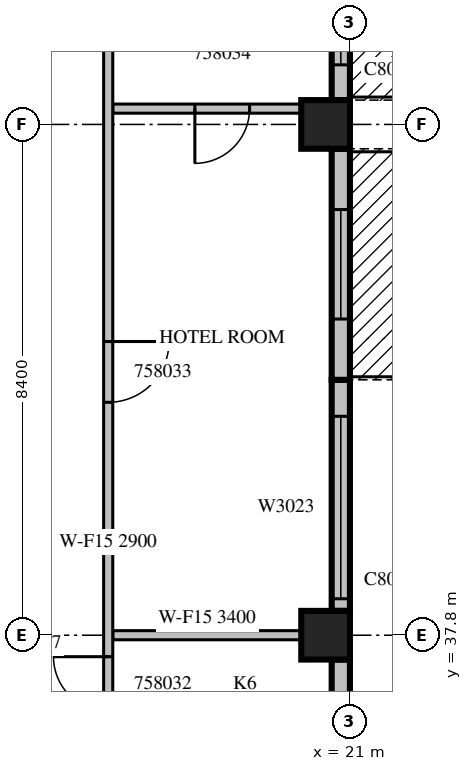
"""IFC4 building model, lengths in metres.
Left out: names, types, materials, properties, quantities, classifications, styles, units other than length and angle.
Written with IfcOpenShell. Run it as: python <this file> out.ifc"""

import sys

from ifc_helpers import new_model, si_unit, direction, frame, frame_2d, origin, origin_2d, place, context, subcontext, project, spatial, rectangle, extrude, source, transform, mapped, element, fill, save


model = new_model("IFC4")
c1 = context("Model", 3, precision=1e-05, world=origin(), true_north=direction((0.0, 1.0)))
c2 = subcontext(c1, "Body", "Model", "MODEL_VIEW")
j1 = project(units=[si_unit("LENGTHUNIT", "METRE"), si_unit("PLANEANGLEUNIT", "RADIAN")], contexts=[c1])
p1 = place(None, origin())
s1 = spatial("IfcSite", under=j1, at=p1, CompositionType="ELEMENT")
p2 = place(p1, origin())
s2 = spatial("IfcBuilding", under=s1, at=p2, CompositionType="ELEMENT")
p3 = place(p2, frame((0.0, 0.0, 253.8)))
s3 = spatial("IfcBuildingStorey", under=s2, at=p3, CompositionType="ELEMENT", Elevation=253.8)
m1 = source(origin(), c2, "Body", "SweptSolid", [
    extrude(rectangle(XDim=0.8, YDim=0.8, at=origin_2d()), origin(), (0.0, 0.0, 1.0), 3.8),
])
for number, where, z_axis, x_axis in (
    (1, (20.6, 37.8, 0.0), (0.0, 0.0, 1.0), (1.0, 0.0, 0.0)),
    (2, (20.6, 46.2, 0.0), (0.0, 0.0, 1.0), (1.0, 0.0, 0.0)),
):
    element("IfcColumn", number, at=place(p3, frame(where, z_axis=z_axis, x_axis=x_axis)), inside=s3, PredefinedType="COLUMN", context=c2, shape_type="MappedRepresentation", body=[
        mapped(m1, transform((0.0, 0.0, 0.0), scale=1.0)),
    ])
m2 = source(origin(), c2, "Body", "SweptSolid", [
    extrude(rectangle(XDim=7.6, YDim=0.3, at=frame_2d((3.8, 0.0))), origin(), (0.0, 0.0, 1.0), 2.9),
])
p4 = place(p3, frame((20.85, 29.8, 0.0), z_axis=(0.0, 0.0, 1.0), x_axis=(0.0, 1.0, 0.0)))
e3 = element("IfcWall", 3, at=p4, inside=s3, PredefinedType="STANDARD", context=c2, shape_type="MappedRepresentation", body=[
    mapped(m2, transform((0.0, 0.0, 0.0), scale=1.0)),
])
m3 = source(origin(), c2, "Body", "SweptSolid", [
    extrude(rectangle(XDim=1.2, YDim=2.3, at=frame_2d((0.6, 1.15))), frame((0.0, 0.16, 0.0), z_axis=(0.0, -1.0, 0.0), x_axis=(1.0, 0.0, 0.0)), (0.0, 0.0, 1.0), 0.32),
])
p5 = place(p4, frame((0.546, 0.0, 0.6)))
e4 = element("IfcOpeningElement", 4, at=p5, cuts=e3, PredefinedType="OPENING", context=c2, shape_type="MappedRepresentation", body=[
    mapped(m3, transform((0.0, 0.0, 0.0), scale=1.0)),
])
p6 = place(p4, frame((4.71, 0.0, 0.6)))
e5 = element("IfcOpeningElement", 5, at=p6, cuts=e3, PredefinedType="OPENING", context=c2, shape_type="MappedRepresentation", body=[
    mapped(m3, transform((0.0, 0.0, 0.0), scale=1.0)),
])
m4 = source(origin(), c2, "Body", "SweptSolid", [
    extrude(rectangle(XDim=3.8, YDim=0.3, at=frame_2d((1.9, 0.0))), origin(), (0.0, 0.0, 1.0), 3.4),
])
p7 = place(p3, frame((20.85, 38.2, 0.0), z_axis=(0.0, 0.0, 1.0), x_axis=(0.0, 1.0, 0.0)))
e6 = element("IfcWall", 6, at=p7, inside=s3, PredefinedType="STANDARD", context=c2, shape_type="MappedRepresentation", body=[
    mapped(m4, transform((0.0, 0.0, 0.0), scale=1.0)),
])
m5 = source(origin(), c2, "Body", "SweptSolid", [
    extrude(rectangle(XDim=3.0, YDim=2.3, at=frame_2d((1.5, 1.15))), frame((0.0, 0.16, 0.0), z_axis=(0.0, -1.0, 0.0), x_axis=(1.0, 0.0, 0.0)), (0.0, 0.0, 1.0), 0.32),
])
p8 = place(p7, frame((0.2, 0.0, 0.6)))
e7 = element("IfcOpeningElement", 7, at=p8, cuts=e6, PredefinedType="OPENING", context=c2, shape_type="MappedRepresentation", body=[
    mapped(m5, transform((0.0, 0.0, 0.0), scale=1.0)),
])
p9 = place(p3, frame((20.85, 42.0, 0.0), z_axis=(0.0, 0.0, 1.0), x_axis=(0.0, 1.0, 0.0)))
e8 = element("IfcWall", 8, at=p9, inside=s3, PredefinedType="STANDARD", context=c2, shape_type="MappedRepresentation", body=[
    mapped(m4, transform((0.0, 0.0, 0.0), scale=1.0)),
])
m6 = source(origin(), c2, "Body", "SweptSolid", [
    extrude(rectangle(XDim=1.8, YDim=2.4, at=frame_2d((0.9, 1.2))), frame((0.0, 0.16, 0.0), z_axis=(0.0, -1.0, 0.0), x_axis=(1.0, 0.0, 0.0)), (0.0, 0.0, 1.0), 0.32),
])
p10 = place(p9, frame((1.0, 0.0, 0.0)))
e9 = element("IfcOpeningElement", 9, at=p10, cuts=e8, PredefinedType="OPENING", context=c2, shape_type="MappedRepresentation", body=[
    mapped(m6, transform((0.0, 0.0, 0.0), scale=1.0)),
])
m7 = source(origin(), c2, "Body", "SweptSolid", [
    extrude(rectangle(XDim=2.96, YDim=0.3, at=frame_2d((1.48, 0.0))), origin(), (0.0, 0.0, 1.0), 3.4),
])
p11 = place(p3, frame((20.85, 46.6, 0.0), z_axis=(0.0, 0.0, 1.0), x_axis=(0.0, 1.0, 0.0)))
e10 = element("IfcWall", 10, at=p11, inside=s3, PredefinedType="STANDARD", context=c2, shape_type="MappedRepresentation", body=[
    mapped(m7, transform((0.0, 0.0, 0.0), scale=1.0)),
])
p12 = place(p11, frame((0.58, 0.0, 0.0)))
e11 = element("IfcOpeningElement", 11, at=p12, cuts=e10, PredefinedType="OPENING", context=c2, shape_type="MappedRepresentation", body=[
    mapped(m6, transform((0.0, 0.0, 0.0), scale=1.0)),
])
m8 = source(origin(), c2, "Body", "SweptSolid", [
    extrude(rectangle(XDim=3.101, YDim=0.15, at=frame_2d((1.55, 0.0))), origin(), (0.0, 0.0, 1.0), 3.4),
])
p13 = place(p3, frame((17.1, 46.46, 0.0), z_axis=(0.0, 0.0, 1.0), x_axis=(1.0, 0.0, 0.0)))
e12 = element("IfcWall", 12, at=p13, inside=s3, PredefinedType="PARTITIONING", context=c2, shape_type="MappedRepresentation", body=[
    mapped(m8, transform((0.0, 0.0, 0.0), scale=1.0)),
])
m9 = source(origin(), c2, "Body", "SweptSolid", [
    extrude(rectangle(XDim=0.9, YDim=2.1, at=frame_2d((0.45, 1.05))), frame((0.0, 0.085, 0.0), z_axis=(0.0, -1.0, 0.0), x_axis=(1.0, 0.0, 0.0)), (0.0, 0.0, 1.0), 0.17),
])
p14 = place(p13, frame((1.35, 0.0, 0.0)))
e13 = element("IfcOpeningElement", 13, at=p14, cuts=e12, PredefinedType="OPENING", context=c2, shape_type="MappedRepresentation", body=[
    mapped(m9, transform((0.0, 0.0, 0.0), scale=1.0)),
])
p15 = place(p3, frame((20.201, 37.8, 0.0), z_axis=(0.0, 0.0, 1.0), x_axis=(-1.0, 0.0, 0.0)))
e14 = element("IfcWall", 14, at=p15, inside=s3, PredefinedType="PARTITIONING", context=c2, shape_type="MappedRepresentation", body=[
    mapped(m8, transform((0.0, 0.0, 0.0), scale=1.0)),
])
m10 = source(origin(), c2, "Body", "SweptSolid", [
    extrude(rectangle(XDim=19.86, YDim=0.15, at=frame_2d((9.93, 0.0))), origin(), (0.0, 0.0, 1.0), 2.9),
])
p16 = place(p3, frame((17.025, 49.26, 0.0), z_axis=(0.0, 0.0, 1.0), x_axis=(0.0, -1.0, 0.0)))
e15 = element("IfcWall", 15, at=p16, inside=s3, PredefinedType="PARTITIONING", context=c2, shape_type="MappedRepresentation", body=[
    mapped(m10, transform((0.0, 0.0, 0.0), scale=1.0)),
])
p17 = place(p16, frame((18.076, 0.0, 0.0)))
e16 = element("IfcOpeningElement", 16, at=p17, cuts=e15, PredefinedType="OPENING", context=c2, shape_type="MappedRepresentation", body=[
    mapped(m9, transform((0.0, 0.0, 0.0), scale=1.0)),
])
p18 = place(p16, frame((15.976, 0.0, 0.0)))
e17 = element("IfcOpeningElement", 17, at=p18, cuts=e15, PredefinedType="OPENING", context=c2, shape_type="MappedRepresentation", body=[
    mapped(m9, transform((0.0, 0.0, 0.0), scale=1.0)),
])
p19 = place(p16, frame((13.913, 0.0, 0.0)))
e18 = element("IfcOpeningElement", 18, at=p19, cuts=e15, PredefinedType="OPENING", context=c2, shape_type="MappedRepresentation", body=[
    mapped(m9, transform((0.0, 0.0, 0.0), scale=1.0)),
])
p20 = place(p16, frame((11.813, 0.0, 0.0)))
e19 = element("IfcOpeningElement", 19, at=p20, cuts=e15, PredefinedType="OPENING", context=c2, shape_type="MappedRepresentation", body=[
    mapped(m9, transform((0.0, 0.0, 0.0), scale=1.0)),
])
m11 = source(origin(), c2, "Body", "SweptSolid", [
    extrude(rectangle(XDim=1.0, YDim=2.1, at=frame_2d((0.5, 1.05))), frame((0.0, 0.085, 0.0), z_axis=(0.0, -1.0, 0.0), x_axis=(1.0, 0.0, 0.0)), (0.0, 0.0, 1.0), 0.17),
])
p21 = place(p16, frame((6.63, 0.0, 0.0)))
e20 = element("IfcOpeningElement", 20, at=p21, cuts=e15, PredefinedType="OPENING", context=c2, shape_type="MappedRepresentation", body=[
    mapped(m11, transform((0.0, 0.0, 0.0), scale=1.0)),
])
m12 = source(origin(), c2, "Body", "SweptSolid", [
    extrude(rectangle(XDim=3.0, YDim=2.3, at=frame_2d((1.5, 1.15))), frame((0.0, 0.03, 0.0), z_axis=(0.0, -1.0, 0.0), x_axis=(1.0, 0.0, 0.0)), (0.0, 0.0, 1.0), 0.06),
])
p22 = place(p8, origin())
e21 = element("IfcWindow", 21, at=p22, inside=s3, PartitioningType="SINGLE_PANEL", PredefinedType="WINDOW", context=c2, shape_type="MappedRepresentation", body=[
    mapped(m12, transform((0.0, 0.0, 0.0), scale=1.0)),
])
fill(e7, e21)
m13 = source(origin(), c2, "Body", "SweptSolid", [
    extrude(rectangle(XDim=1.8, YDim=2.4, at=frame_2d((0.9, 1.2))), frame((0.0, 0.025, 0.0), z_axis=(0.0, -1.0, 0.0), x_axis=(1.0, 0.0, 0.0)), (0.0, 0.0, 1.0), 0.05),
])
p23 = place(p10, origin())
e22 = element("IfcDoor", 22, at=p23, inside=s3, OperationType="SLIDING_TO_LEFT", PredefinedType="DOOR", context=c2, shape_type="MappedRepresentation", body=[
    mapped(m13, transform((0.0, 0.0, 0.0), scale=1.0)),
])
fill(e9, e22)
p24 = place(p12, origin())
e23 = element("IfcDoor", 23, at=p24, inside=s3, OperationType="SLIDING_TO_LEFT", PredefinedType="DOOR", context=c2, shape_type="MappedRepresentation", body=[
    mapped(m13, transform((0.0, 0.0, 0.0), scale=1.0)),
])
fill(e11, e23)
m14 = source(origin(), c2, "Body", "SweptSolid", [
    extrude(rectangle(XDim=0.9, YDim=2.1, at=frame_2d((0.45, 1.05))), frame((0.0, 0.025, 0.0), z_axis=(0.0, -1.0, 0.0), x_axis=(1.0, 0.0, 0.0)), (0.0, 0.0, 1.0), 0.05),
])
p25 = place(p20, origin())
e24 = element("IfcDoor", 24, at=p25, inside=s3, OperationType="SINGLE_SWING_RIGHT", PredefinedType="DOOR", context=c2, shape_type="MappedRepresentation", body=[
    mapped(m14, transform((0.0, 0.0, 0.0), scale=1.0)),
])
fill(e19, e24)
m15 = source(origin(), c2, "Body", "SweptSolid", [
    extrude(rectangle(XDim=1.0, YDim=2.1, at=frame_2d((0.5, 1.05))), frame((0.0, 0.025, 0.0), z_axis=(0.0, -1.0, 0.0), x_axis=(1.0, 0.0, 0.0)), (0.0, 0.0, 1.0), 0.05),
])
p26 = place(p21, origin())
e25 = element("IfcDoor", 25, at=p26, inside=s3, OperationType="SINGLE_SWING_LEFT", PredefinedType="DOOR", context=c2, shape_type="MappedRepresentation", body=[
    mapped(m15, transform((0.0, 0.0, 0.0), scale=1.0)),
])
fill(e20, e25)
p27 = place(p14, origin())
e26 = element("IfcDoor", 26, at=p27, inside=s3, OperationType="SINGLE_SWING_RIGHT", PredefinedType="DOOR", context=c2, shape_type="MappedRepresentation", body=[
    mapped(m14, transform((0.0, 0.0, 0.0), scale=1.0)),
])
fill(e13, e26)
save(model, sys.argv[1])
